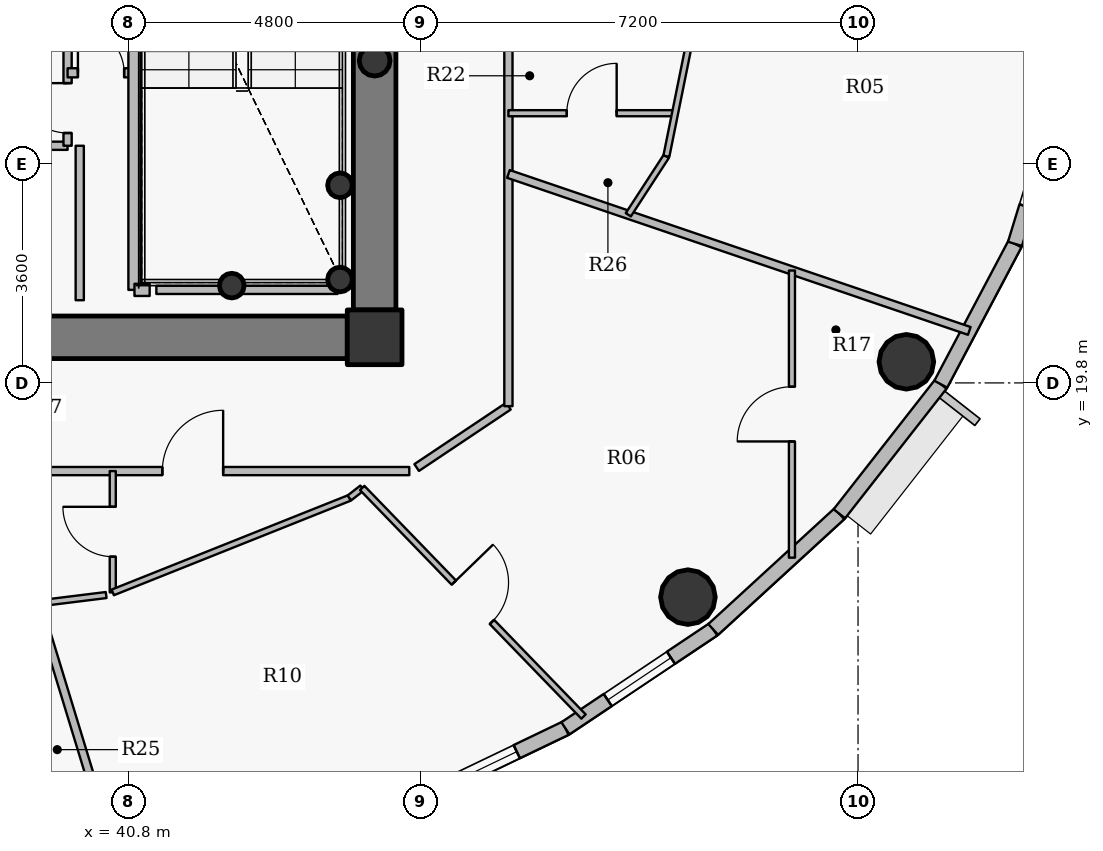
"""IFC4 building model, lengths in metres.
Left out: names, types, materials, properties, quantities, classifications, styles, units other than length and angle.
Written with IfcOpenShell. Run it as: python <this file> out.ifc"""

import sys

from ifc_helpers import new_model, si_unit, direction, frame, frame_2d, origin, origin_2d, place, context, subcontext, project, spatial, rectangle, hollow_circle, extrude, source, transform, mapped, element, fill, save


model = new_model("IFC4")
c1 = context("Model", 3, precision=1e-05, world=origin(), true_north=direction((0.0, 1.0)))
c2 = subcontext(c1, "Body", "Model", "MODEL_VIEW")
j1 = project(units=[si_unit("LENGTHUNIT", "METRE"), si_unit("PLANEANGLEUNIT", "RADIAN")], contexts=[c1])
p1 = place(None, origin())
s1 = spatial("IfcSite", under=j1, at=p1, CompositionType="ELEMENT")
p2 = place(p1, origin())
s2 = spatial("IfcBuilding", under=s1, at=p2, CompositionType="ELEMENT")
p3 = place(p2, frame((0.0, 0.0, 335.4)))
s3 = spatial("IfcBuildingStorey", under=s2, at=p3, CompositionType="ELEMENT", Elevation=335.4)
p4 = place(p3, frame((44.85, 20.55, 0.0), z_axis=(0.0, 0.0, 1.0), x_axis=(1.0, 0.0, 0.0)))
e1 = element("IfcColumn", 1, at=p4, inside=s3, PredefinedType="COLUMN", context=c2, shape_type="SweptSolid", body=[
    extrude(rectangle(XDim=0.9, YDim=0.9, at=origin_2d()), origin(), (0.0, 0.0, 1.0), 3.8),
])
for number, where, z_axis, x_axis in (
    (2, (44.28, 21.5, 0.0), (0.0, 0.0, 1.0), (1.0, 0.0, 0.0)),
    (3, (44.28, 23.05, 0.0), (0.0, 0.0, 1.0), (1.0, 0.0, 0.0)),
    (4, (42.5, 21.4, 0.0), (0.0, 0.0, 1.0), (1.0, 0.0, 0.0)),
):
    element("IfcColumn", number, at=place(p3, frame(where, z_axis=z_axis, x_axis=x_axis)), inside=s3, PredefinedType="COLUMN", context=c2, shape_type="SweptSolid", body=[
        extrude(hollow_circle(Radius=0.203, WallThickness=0.016, at=origin_2d()), origin(), (0.0, 0.0, 1.0), 3.8),
    ])
p5 = place(p3, frame((44.85, 33.0, 0.0), z_axis=(0.0, 0.0, 1.0), x_axis=(0.0, -1.0, 0.0)))
e5 = element("IfcWall", 5, at=p5, inside=s3, PredefinedType="SHEAR", context=c2, shape_type="SweptSolid", body=[
    extrude(rectangle(XDim=12.0, YDim=0.7, at=frame_2d((6.0, 0.0))), origin(), (0.0, 0.0, 1.0), 3.1),
])
p6 = place(p3, frame((44.4, 20.55, 0.0), z_axis=(0.0, 0.0, 1.0), x_axis=(-1.0, 0.0, 0.0)))
e6 = element("IfcWall", 6, at=p6, inside=s3, PredefinedType="SHEAR", context=c2, shape_type="SweptSolid", body=[
    extrude(rectangle(XDim=16.8, YDim=0.7, at=frame_2d((8.4, 0.0))), origin(), (0.0, 0.0, 1.0), 3.1),
])
p7 = place(p6, frame((13.0, 0.0, 0.0)))
e7 = element("IfcOpeningElement", 7, at=p7, cuts=e6, PredefinedType="OPENING", context=c2, shape_type="SweptSolid", body=[
    extrude(rectangle(XDim=1.15, YDim=2.15, at=origin_2d()), frame((0.575, 0.36, 1.075), z_axis=(0.0, -1.0, 0.0), x_axis=(1.0, 0.0, 0.0)), (0.0, 0.0, 1.0), 0.72),
])
p8 = place(p6, frame((9.15, 0.0, 0.0)))
e8 = element("IfcOpeningElement", 8, at=p8, cuts=e6, PredefinedType="OPENING", context=c2, shape_type="SweptSolid", body=[
    extrude(rectangle(XDim=1.15, YDim=2.15, at=origin_2d()), frame((0.575, 0.36, 1.075), z_axis=(0.0, -1.0, 0.0), x_axis=(1.0, 0.0, 0.0)), (0.0, 0.0, 1.0), 0.72),
])
for number, where, z_axis, x_axis in (
    (9, (50.002, 16.277, 0.0), (0.0, 0.0, 1.0), (1.0, 0.0, 0.0)),
    (10, (53.595, 20.147, 0.0), (0.0, 0.0, 1.0), (1.0, 0.0, 0.0)),
):
    element("IfcColumn", number, at=place(p3, frame(where, z_axis=z_axis, x_axis=x_axis)), inside=s3, PredefinedType="COLUMN", context=c2, shape_type="SweptSolid", body=[
        extrude(hollow_circle(Radius=0.45, WallThickness=0.028, at=origin_2d()), origin(), (0.0, 0.0, 1.0), 3.8),
    ])
p9 = place(p3, frame((44.85, 25.1, 0.0), z_axis=(0.0, 0.0, 1.0), x_axis=(1.0, 0.0, 0.0)))
e11 = element("IfcColumn", 11, at=p9, inside=s3, PredefinedType="COLUMN", context=c2, shape_type="SweptSolid", body=[
    extrude(hollow_circle(Radius=0.254, WallThickness=0.02, at=origin_2d()), origin(), (0.0, 0.0, 1.0), 3.8),
])
p10 = place(p3, frame((47.988, 14.12, 0.0), z_axis=(0.0, 0.0, 1.0), x_axis=(-0.901557057889, -0.432660226241, 0.0)))
e12 = element("IfcWall", 12, at=p10, inside=s3, PredefinedType="SOLIDWALL", context=c2, shape_type="SweptSolid", body=[
    extrude(rectangle(XDim=3.025, YDim=0.24, at=frame_2d((1.513, 0.0))), origin(), (0.0, 0.0, 1.0), 3.55),
])
p11 = place(p10, frame((0.888, 0.0, 0.9)))
e13 = element("IfcOpeningElement", 13, at=p11, cuts=e12, PredefinedType="OPENING", context=c2, shape_type="SweptSolid", body=[
    extrude(rectangle(XDim=1.25, YDim=1.65, at=origin_2d()), frame((0.625, 0.13, 0.825), z_axis=(0.0, -1.0, 0.0), x_axis=(1.0, 0.0, 0.0)), (0.0, 0.0, 1.0), 0.26),
])
p12 = place(p3, frame((50.419, 15.746, 0.0), z_axis=(0.0, 0.0, 1.0), x_axis=(-0.831201688654, -0.555970999944, 0.0)))
e14 = element("IfcWall", 14, at=p12, inside=s3, PredefinedType="SOLIDWALL", context=c2, shape_type="SweptSolid", body=[
    extrude(rectangle(XDim=2.925, YDim=0.24, at=frame_2d((1.462, 0.0))), origin(), (0.0, 0.0, 1.0), 3.55),
])
p13 = place(p12, frame((0.837, 0.0, 0.9)))
e15 = element("IfcOpeningElement", 15, at=p13, cuts=e14, PredefinedType="OPENING", context=c2, shape_type="SweptSolid", body=[
    extrude(rectangle(XDim=1.25, YDim=1.65, at=origin_2d()), frame((0.625, 0.13, 0.825), z_axis=(0.0, -1.0, 0.0), x_axis=(1.0, 0.0, 0.0)), (0.0, 0.0, 1.0), 0.26),
])
p14 = place(p3, frame((52.493, 17.648, 0.0), z_axis=(0.0, 0.0, 1.0), x_axis=(-0.737020907932, -0.675869944051, 0.0)))
e16 = element("IfcWall", 16, at=p14, inside=s3, PredefinedType="SOLIDWALL", context=c2, shape_type="SweptSolid", body=[
    extrude(rectangle(XDim=2.815, YDim=0.24, at=frame_2d((1.407, 0.0))), origin(), (0.0, 0.0, 1.0), 3.55),
])
p15 = place(p3, frame((54.161, 19.779, 0.0), z_axis=(0.0, 0.0, 1.0), x_axis=(-0.616286367698, -0.78752213492, 0.0)))
e17 = element("IfcWall", 17, at=p15, inside=s3, PredefinedType="SOLIDWALL", context=c2, shape_type="SweptSolid", body=[
    extrude(rectangle(XDim=2.706, YDim=0.24, at=frame_2d((1.353, 0.0))), origin(), (0.0, 0.0, 1.0), 2.035),
])
p16 = place(p3, frame((55.381, 22.087, 0.0), z_axis=(0.0, 0.0, 1.0), x_axis=(-0.467487999989, -0.883999417345, 0.0)))
e18 = element("IfcWall", 18, at=p16, inside=s3, PredefinedType="SOLIDWALL", context=c2, shape_type="SweptSolid", body=[
    extrude(rectangle(XDim=2.61, YDim=0.24, at=frame_2d((1.305, 0.0))), origin(), (0.0, 0.0, 1.0), 2.035),
])
p17 = place(p3, frame((56.125, 24.513, 0.0), z_axis=(0.0, 0.0, 1.0), x_axis=(-0.293105547213, -0.956080089842, 0.0)))
e19 = element("IfcWall", 19, at=p17, inside=s3, PredefinedType="SOLIDWALL", context=c2, shape_type="SweptSolid", body=[
    extrude(rectangle(XDim=2.538, YDim=0.24, at=frame_2d((1.269, 0.0))), origin(), (0.0, 0.0, 1.0), 3.55),
])
p18 = place(p17, frame((0.644, 0.0, 0.9)))
e20 = element("IfcOpeningElement", 20, at=p18, cuts=e19, PredefinedType="OPENING", context=c2, shape_type="SweptSolid", body=[
    extrude(rectangle(XDim=1.25, YDim=1.65, at=origin_2d()), frame((0.625, 0.13, 0.825), z_axis=(0.0, -1.0, 0.0), x_axis=(1.0, 0.0, 0.0)), (0.0, 0.0, 1.0), 0.26),
])
p19 = place(p3, frame((26.58, 18.35, 0.0), z_axis=(0.0, 0.0, 1.0), x_axis=(1.0, 0.0, 0.0)))
e21 = element("IfcWall", 21, at=p19, inside=s3, PredefinedType="PARTITIONING", context=c2, shape_type="SweptSolid", body=[
    extrude(rectangle(XDim=18.84, YDim=0.135, at=frame_2d((9.42, 0.0))), origin(), (0.0, 0.0, 1.0), 3.085),
])
p20 = place(p19, frame((0.94, 0.0, 0.0)))
e22 = element("IfcOpeningElement", 22, at=p20, cuts=e21, PredefinedType="OPENING", context=c2, shape_type="SweptSolid", body=[
    extrude(rectangle(XDim=1.0, YDim=2.15, at=origin_2d()), frame((0.5, 0.078, 1.075), z_axis=(0.0, -1.0, 0.0), x_axis=(1.0, 0.0, 0.0)), (0.0, 0.0, 1.0), 0.155),
])
p21 = place(p19, frame((6.621, 0.0, 0.0)))
e23 = element("IfcOpeningElement", 23, at=p21, cuts=e21, PredefinedType="OPENING", context=c2, shape_type="SweptSolid", body=[
    extrude(rectangle(XDim=1.0, YDim=2.15, at=origin_2d()), frame((0.5, 0.078, 1.075), z_axis=(0.0, -1.0, 0.0), x_axis=(1.0, 0.0, 0.0)), (0.0, 0.0, 1.0), 0.155),
])
p22 = place(p19, frame((14.778, 0.0, 0.0)))
e24 = element("IfcOpeningElement", 24, at=p22, cuts=e21, PredefinedType="OPENING", context=c2, shape_type="SweptSolid", body=[
    extrude(rectangle(XDim=1.0, YDim=2.15, at=origin_2d()), frame((0.5, 0.078, 1.075), z_axis=(0.0, -1.0, 0.0), x_axis=(1.0, 0.0, 0.0)), (0.0, 0.0, 1.0), 0.155),
])
p23 = place(p3, frame((35.45, 23.7, 0.0), z_axis=(0.0, 0.0, 1.0), x_axis=(1.0, 0.0, 0.0)))
e25 = element("IfcWall", 25, at=p23, inside=s3, PredefinedType="PARTITIONING", context=c2, shape_type="SweptSolid", body=[
    extrude(rectangle(XDim=4.35, YDim=0.135, at=frame_2d((2.175, 0.0))), origin(), (0.0, 0.0, 1.0), 3.135),
])
p24 = place(p23, frame((1.625, 0.0, 0.0)))
e26 = element("IfcOpeningElement", 26, at=p24, cuts=e25, PredefinedType="OPENING", context=c2, shape_type="SweptSolid", body=[
    extrude(rectangle(XDim=1.1, YDim=2.15, at=origin_2d()), frame((0.55, 0.078, 1.075), z_axis=(0.0, -1.0, 0.0), x_axis=(1.0, 0.0, 0.0)), (0.0, 0.0, 1.0), 0.155),
])
p25 = place(p3, frame((39.304, 16.171, 0.0), z_axis=(0.0, 0.0, 1.0), x_axis=(0.992405921313, 0.123006045959, 0.0)))
e27 = element("IfcWall", 27, at=p25, inside=s3, PredefinedType="PARTITIONING", context=c2, shape_type="SweptSolid", body=[
    extrude(rectangle(XDim=1.139, YDim=0.1, at=frame_2d((0.57, 0.0))), origin(), (0.0, 0.0, 1.0), 3.085),
])
p26 = place(p3, frame((39.304, 16.171, 0.0), z_axis=(0.0, 0.0, 1.0), x_axis=(0.291820739467, -0.956473029425, 0.0)))
e28 = element("IfcWall", 28, at=p26, inside=s3, PredefinedType="PARTITIONING", context=c2, shape_type="SweptSolid", body=[
    extrude(rectangle(XDim=4.834, YDim=0.135, at=frame_2d((2.417, 0.0))), origin(), (0.0, 0.0, 1.0), 3.035),
])
p27 = place(p3, frame((39.8, 23.7, 0.0), z_axis=(0.0, 0.0, 1.0), x_axis=(0.0, 1.0, 0.0)))
e29 = element("IfcWall", 29, at=p27, inside=s3, PredefinedType="PARTITIONING", context=c2, shape_type="SweptSolid", body=[
    extrude(rectangle(XDim=1.75, YDim=0.135, at=frame_2d((0.875, 0.0))), origin(), (0.0, 0.0, 1.0), 3.55),
])
p28 = place(p27, frame((0.21, 0.0, 0.0)))
e30 = element("IfcOpeningElement", 30, at=p28, cuts=e29, PredefinedType="OPENING", context=c2, shape_type="SweptSolid", body=[
    extrude(rectangle(XDim=0.82, YDim=2.1, at=origin_2d()), frame((0.41, 0.078, 1.05), z_axis=(0.0, -1.0, 0.0), x_axis=(1.0, 0.0, 0.0)), (0.0, 0.0, 1.0), 0.155),
])
p29 = place(p3, frame((39.8, 24.9, 0.0), z_axis=(0.0, 0.0, 1.0), x_axis=(1.0, 0.0, 0.0)))
e31 = element("IfcWall", 31, at=p29, inside=s3, PredefinedType="PARTITIONING", context=c2, shape_type="SweptSolid", body=[
    extrude(rectangle(XDim=1.1, YDim=0.15, at=frame_2d((0.55, 0.0))), origin(), (0.0, 0.0, 1.0), 3.55),
])
p30 = place(p29, frame((0.17, 0.0, 0.0)))
e32 = element("IfcOpeningElement", 32, at=p30, cuts=e31, PredefinedType="OPENING", context=c2, shape_type="SweptSolid", body=[
    extrude(rectangle(XDim=0.76, YDim=2.1, at=origin_2d()), frame((0.38, 0.085, 1.05), z_axis=(0.0, -1.0, 0.0), x_axis=(1.0, 0.0, 0.0)), (0.0, 0.0, 1.0), 0.17),
])
p31 = place(p3, frame((40.543, 16.355, 0.0), z_axis=(0.0, 0.0, 1.0), x_axis=(0.0, 1.0, 0.0)))
e33 = element("IfcWall", 33, at=p31, inside=s3, PredefinedType="PARTITIONING", context=c2, shape_type="SweptSolid", body=[
    extrude(rectangle(XDim=1.995, YDim=0.1, at=frame_2d((0.998, 0.0))), origin(), (0.0, 0.0, 1.0), 3.085),
])
p32 = place(p31, frame((0.588, 0.0, 0.0)))
e34 = element("IfcOpeningElement", 34, at=p32, cuts=e33, PredefinedType="OPENING", context=c2, shape_type="SweptSolid", body=[
    extrude(rectangle(XDim=0.82, YDim=2.1, at=origin_2d()), frame((0.41, 0.06, 1.05), z_axis=(0.0, -1.0, 0.0), x_axis=(1.0, 0.0, 0.0)), (0.0, 0.0, 1.0), 0.12),
])
p33 = place(p3, frame((40.543, 16.355, 0.0), z_axis=(0.0, 0.0, 1.0), x_axis=(0.928785770399, 0.370617043191, 0.0)))
e35 = element("IfcWall", 35, at=p33, inside=s3, PredefinedType="PARTITIONING", context=c2, shape_type="SweptSolid", body=[
    extrude(rectangle(XDim=4.19, YDim=0.1, at=frame_2d((2.095, 0.0))), origin(), (0.0, 0.0, 1.0), 3.085),
])
p34 = place(p3, frame((40.9, 21.33, 0.0), z_axis=(0.0, 0.0, 1.0), x_axis=(0.0, 1.0, 0.0)))
e36 = element("IfcWall", 36, at=p34, inside=s3, PredefinedType="PARTITIONING", context=c2, shape_type="SweptSolid", body=[
    extrude(rectangle(XDim=5.91, YDim=0.2, at=frame_2d((2.955, 0.0))), origin(), (0.0, 0.0, 1.0), 3.085),
])
p35 = place(p3, frame((40.9, 21.33, 0.0), z_axis=(0.0, 0.0, 1.0), x_axis=(1.0, 0.0, 0.0)))
e37 = element("IfcWall", 37, at=p35, inside=s3, PredefinedType="PARTITIONING", context=c2, shape_type="SweptSolid", body=[
    extrude(rectangle(XDim=0.25, YDim=0.2, at=frame_2d((0.125, 0.0))), origin(), (0.0, 0.0, 1.0), 3.085),
])
p36 = place(p3, frame((44.435, 17.908, 0.0), z_axis=(0.0, 0.0, 1.0), x_axis=(0.787427799495, 0.616406895307, 0.0)))
e38 = element("IfcWall", 38, at=p36, inside=s3, PredefinedType="PARTITIONING", context=c2, shape_type="SweptSolid", body=[
    extrude(rectangle(XDim=0.267, YDim=0.1, at=frame_2d((0.133, 0.0))), origin(), (0.0, 0.0, 1.0), 3.55),
])
p37 = place(p3, frame((44.645, 18.073, 0.0), z_axis=(0.0, 0.0, 1.0), x_axis=(0.695656073062, -0.718374991221, 0.0)))
e39 = element("IfcWall", 39, at=p37, inside=s3, PredefinedType="PARTITIONING", context=c2, shape_type="SweptSolid", body=[
    extrude(rectangle(XDim=5.233, YDim=0.1, at=frame_2d((2.617, 0.0))), origin(), (0.0, 0.0, 1.0), 3.035),
])
p38 = place(p37, frame((2.167, 0.0, 0.0)))
e40 = element("IfcOpeningElement", 40, at=p38, cuts=e39, PredefinedType="OPENING", context=c2, shape_type="SweptSolid", body=[
    extrude(rectangle(XDim=0.9, YDim=2.1, at=origin_2d()), frame((0.45, 0.06, 1.05), z_axis=(0.0, -1.0, 0.0), x_axis=(1.0, 0.0, 0.0)), (0.0, 0.0, 1.0), 0.12),
])
p39 = place(p3, frame((45.541, 18.408, 0.0), z_axis=(0.0, 0.0, 1.0), x_axis=(0.831180227396, 0.556003084151, 0.0)))
e41 = element("IfcWall", 41, at=p39, inside=s3, PredefinedType="PARTITIONING", context=c2, shape_type="SweptSolid", body=[
    extrude(rectangle(XDim=1.815, YDim=0.135, at=frame_2d((0.908, 0.0))), origin(), (0.0, 0.0, 1.0), 3.085),
])
p40 = place(p3, frame((47.05, 19.417, 0.0), z_axis=(0.0, 0.0, 1.0), x_axis=(0.0, 1.0, 0.0)))
e42 = element("IfcWall", 42, at=p40, inside=s3, PredefinedType="PARTITIONING", context=c2, shape_type="SweptSolid", body=[
    extrude(rectangle(XDim=15.165, YDim=0.135, at=frame_2d((7.583, 0.0))), origin(), (0.0, 0.0, 1.0), 2.25),
])
p41 = place(p40, frame((9.957, 0.0, 0.0)))
e43 = element("IfcOpeningElement", 43, at=p41, cuts=e42, PredefinedType="OPENING", context=c2, shape_type="SweptSolid", body=[
    extrude(rectangle(XDim=1.0, YDim=2.15, at=origin_2d()), frame((0.5, 0.078, 1.075), z_axis=(0.0, -1.0, 0.0), x_axis=(1.0, 0.0, 0.0)), (0.0, 0.0, 1.0), 0.155),
])
p42 = place(p3, frame((47.05, 23.237, 0.0), z_axis=(0.0, 0.0, 1.0), x_axis=(0.946614475353, -0.32236785673, 0.0)))
e44 = element("IfcWall", 44, at=p42, inside=s3, PredefinedType="PARTITIONING", context=c2, shape_type="SweptSolid", body=[
    extrude(rectangle(XDim=8.007, YDim=0.135, at=frame_2d((4.004, 0.0))), origin(), (0.0, 0.0, 1.0), 3.035),
])
p43 = place(p3, frame((47.05, 24.235, 0.0), z_axis=(0.0, 0.0, 1.0), x_axis=(1.0, 0.0, 0.0)))
e45 = element("IfcWall", 45, at=p43, inside=s3, PredefinedType="PARTITIONING", context=c2, shape_type="SweptSolid", body=[
    extrude(rectangle(XDim=2.741, YDim=0.1, at=frame_2d((1.37, 0.0))), origin(), (0.0, 0.0, 1.0), 3.55),
])
p44 = place(p43, frame((0.96, 0.0, 0.0)))
e46 = element("IfcOpeningElement", 46, at=p44, cuts=e45, PredefinedType="OPENING", context=c2, shape_type="SweptSolid", body=[
    extrude(rectangle(XDim=0.82, YDim=2.1, at=origin_2d()), frame((0.41, 0.06, 1.05), z_axis=(0.0, -1.0, 0.0), x_axis=(1.0, 0.0, 0.0)), (0.0, 0.0, 1.0), 0.12),
])
p45 = place(p3, frame((49.022, 22.565, 0.0), z_axis=(0.0, 0.0, 1.0), x_axis=(0.545436909984, 0.838151881957, 0.0)))
e47 = element("IfcWall", 47, at=p45, inside=s3, PredefinedType="PARTITIONING", context=c2, shape_type="SweptSolid", body=[
    extrude(rectangle(XDim=1.148, YDim=0.1, at=frame_2d((0.574, 0.0))), origin(), (0.0, 0.0, 1.0), 3.55),
])
p46 = place(p3, frame((49.648, 23.527, 0.0), z_axis=(0.0, 0.0, 1.0), x_axis=(0.198249177906, 0.980151653296, 0.0)))
e48 = element("IfcWall", 48, at=p46, inside=s3, PredefinedType="PARTITIONING", context=c2, shape_type="SweptSolid", body=[
    extrude(rectangle(XDim=3.543, YDim=0.1, at=frame_2d((1.771, 0.0))), origin(), (0.0, 0.0, 1.0), 3.085),
])
p47 = place(p3, frame((51.713, 16.926, 0.0), z_axis=(0.0, 0.0, 1.0), x_axis=(0.0, 1.0, 0.0)))
e49 = element("IfcWall", 49, at=p47, inside=s3, PredefinedType="PARTITIONING", context=c2, shape_type="SweptSolid", body=[
    extrude(rectangle(XDim=4.722, YDim=0.1, at=frame_2d((2.361, 0.0))), origin(), (0.0, 0.0, 1.0), 2.25),
])
p48 = place(p47, frame((1.911, 0.0, 0.0)))
e50 = element("IfcOpeningElement", 50, at=p48, cuts=e49, PredefinedType="OPENING", context=c2, shape_type="SweptSolid", body=[
    extrude(rectangle(XDim=0.9, YDim=2.1, at=origin_2d()), frame((0.45, 0.06, 1.05), z_axis=(0.0, -1.0, 0.0), x_axis=(1.0, 0.0, 0.0)), (0.0, 0.0, 1.0), 0.12),
])
p49 = place(p3, frame((44.24, 21.33, 0.0), z_axis=(0.0, 0.0, 1.0), x_axis=(-1.0, 0.0, 0.0)))
e51 = element("IfcWall", 51, at=p49, inside=s3, PredefinedType="PARTITIONING", context=c2, shape_type="SweptSolid", body=[
    extrude(rectangle(XDim=2.98, YDim=0.135, at=frame_2d((1.49, 0.0))), origin(), (0.0, 0.0, 1.0), 3.085),
])
p50 = place(p3, frame((40.0, 23.7, 0.0), z_axis=(0.0, 0.0, 1.0), x_axis=(0.0, -1.0, 0.0)))
e52 = element("IfcWall", 52, at=p50, inside=s3, PredefinedType="PARTITIONING", context=c2, shape_type="SweptSolid", body=[
    extrude(rectangle(XDim=2.54, YDim=0.135, at=frame_2d((1.27, 0.0))), origin(), (0.0, 0.0, 1.0), 3.085),
])
p51 = place(p3, frame((44.41, 20.2, 0.0), z_axis=(0.0, 0.0, 1.0), x_axis=(1.0, 0.0, 0.0)))
e53 = element("IfcWall", 53, at=p51, inside=s3, PredefinedType="PARTITIONING", context=c2, shape_type="SweptSolid", body=[
    extrude(rectangle(XDim=0.79, YDim=0.135, at=frame_2d((0.395, 0.0))), origin(), (0.0, 0.0, 1.0), 2.25),
])
p52 = place(p3, frame((45.2, 20.508, 0.0), z_axis=(0.0, 0.0, 1.0), x_axis=(0.0, 1.0, 0.0)))
e54 = element("IfcWall", 54, at=p52, inside=s3, PredefinedType="PARTITIONING", context=c2, shape_type="SweptSolid", body=[
    extrude(rectangle(XDim=0.482, YDim=0.135, at=frame_2d((0.241, 0.0))), origin(), (0.0, 0.0, 1.0), 3.55),
])
m1 = source(origin(), c2, "Body", "SweptSolid", [
    extrude(rectangle(XDim=1.25, YDim=1.65, at=origin_2d()), frame((0.625, 0.03, 0.825), z_axis=(0.0, -1.0, 0.0), x_axis=(1.0, 0.0, 0.0)), (0.0, 0.0, 1.0), 0.06),
])
p53 = place(p11, origin())
e55 = element("IfcWindow", 55, at=p53, inside=s3, PartitioningType="SINGLE_PANEL", PredefinedType="WINDOW", context=c2, shape_type="MappedRepresentation", body=[
    mapped(m1, transform((0.0, 0.0, 0.0), x_axis=(1.0, 0.0, 0.0), y_axis=(0.0, 1.0, 0.0), z_axis=(0.0, 0.0, 1.0), scale=1.0)),
])
fill(e13, e55)
p54 = place(p13, origin())
e56 = element("IfcWindow", 56, at=p54, inside=s3, PartitioningType="SINGLE_PANEL", PredefinedType="WINDOW", context=c2, shape_type="MappedRepresentation", body=[
    mapped(m1, transform((0.0, 0.0, 0.0), x_axis=(1.0, 0.0, 0.0), y_axis=(0.0, 1.0, 0.0), z_axis=(0.0, 0.0, 1.0), scale=1.0)),
])
fill(e15, e56)
m2 = source(origin(), c2, "Body", "SweptSolid", [
    extrude(rectangle(XDim=1.0, YDim=2.15, at=origin_2d()), frame((0.5, 0.025, 1.075), z_axis=(0.0, -1.0, 0.0), x_axis=(1.0, 0.0, 0.0)), (0.0, 0.0, 1.0), 0.05),
])
p55 = place(p22, origin())
e57 = element("IfcDoor", 57, at=p55, inside=s3, OperationType="SINGLE_SWING_RIGHT", PredefinedType="DOOR", context=c2, shape_type="MappedRepresentation", body=[
    mapped(m2, transform((0.0, 0.0, 0.0), x_axis=(1.0, 0.0, 0.0), y_axis=(0.0, 1.0, 0.0), z_axis=(0.0, 0.0, 1.0), scale=1.0)),
])
fill(e24, e57)
m3 = source(origin(), c2, "Body", "SweptSolid", [
    extrude(rectangle(XDim=0.9, YDim=2.1, at=origin_2d()), frame((0.45, 0.025, 1.05), z_axis=(0.0, -1.0, 0.0), x_axis=(1.0, 0.0, 0.0)), (0.0, 0.0, 1.0), 0.05),
])
p56 = place(p38, origin())
e58 = element("IfcDoor", 58, at=p56, inside=s3, OperationType="SINGLE_SWING_LEFT", PredefinedType="DOOR", context=c2, shape_type="MappedRepresentation", body=[
    mapped(m3, transform((0.0, 0.0, 0.0), x_axis=(1.0, 0.0, 0.0), y_axis=(0.0, 1.0, 0.0), z_axis=(0.0, 0.0, 1.0), scale=1.0)),
])
fill(e40, e58)
m4 = source(origin(), c2, "Body", "SweptSolid", [
    extrude(rectangle(XDim=0.82, YDim=2.1, at=origin_2d()), frame((0.41, 0.025, 1.05), z_axis=(0.0, -1.0, 0.0), x_axis=(1.0, 0.0, 0.0)), (0.0, 0.0, 1.0), 0.05),
])
p57 = place(p32, origin())
e59 = element("IfcDoor", 59, at=p57, inside=s3, OperationType="SINGLE_SWING_RIGHT", PredefinedType="DOOR", context=c2, shape_type="MappedRepresentation", body=[
    mapped(m4, transform((0.0, 0.0, 0.0), x_axis=(1.0, 0.0, 0.0), y_axis=(0.0, 1.0, 0.0), z_axis=(0.0, 0.0, 1.0), scale=1.0)),
])
fill(e34, e59)
p58 = place(p48, origin())
e60 = element("IfcDoor", 60, at=p58, inside=s3, OperationType="SINGLE_SWING_LEFT", PredefinedType="DOOR", context=c2, shape_type="MappedRepresentation", body=[
    mapped(m3, transform((0.0, 0.0, 0.0), x_axis=(1.0, 0.0, 0.0), y_axis=(0.0, 1.0, 0.0), z_axis=(0.0, 0.0, 1.0), scale=1.0)),
])
fill(e50, e60)
p59 = place(p44, origin())
e61 = element("IfcDoor", 61, at=p59, inside=s3, OperationType="SINGLE_SWING_RIGHT", PredefinedType="DOOR", context=c2, shape_type="MappedRepresentation", body=[
    mapped(m4, transform((0.0, 0.0, 0.0), x_axis=(1.0, 0.0, 0.0), y_axis=(0.0, 1.0, 0.0), z_axis=(0.0, 0.0, 1.0), scale=1.0)),
])
fill(e46, e61)
p60 = place(p28, origin())
e62 = element("IfcDoor", 62, at=p60, inside=s3, OperationType="SINGLE_SWING_RIGHT", PredefinedType="DOOR", context=c2, shape_type="MappedRepresentation", body=[
    mapped(m4, transform((0.0, 0.0, 0.0), x_axis=(1.0, 0.0, 0.0), y_axis=(0.0, 1.0, 0.0), z_axis=(0.0, 0.0, 1.0), scale=1.0)),
])
fill(e30, e62)
m5 = source(origin(), c2, "Body", "SweptSolid", [
    extrude(rectangle(XDim=0.76, YDim=2.1, at=origin_2d()), frame((0.38, 0.025, 1.05), z_axis=(0.0, -1.0, 0.0), x_axis=(1.0, 0.0, 0.0)), (0.0, 0.0, 1.0), 0.05),
])
p61 = place(p30, origin())
e63 = element("IfcDoor", 63, at=p61, inside=s3, OperationType="SINGLE_SWING_LEFT", PredefinedType="DOOR", context=c2, shape_type="MappedRepresentation", body=[
    mapped(m5, transform((0.0, 0.0, 0.0), x_axis=(1.0, 0.0, 0.0), y_axis=(0.0, 1.0, 0.0), z_axis=(0.0, 0.0, 1.0), scale=1.0)),
])
fill(e32, e63)
save(model, sys.argv[1])
